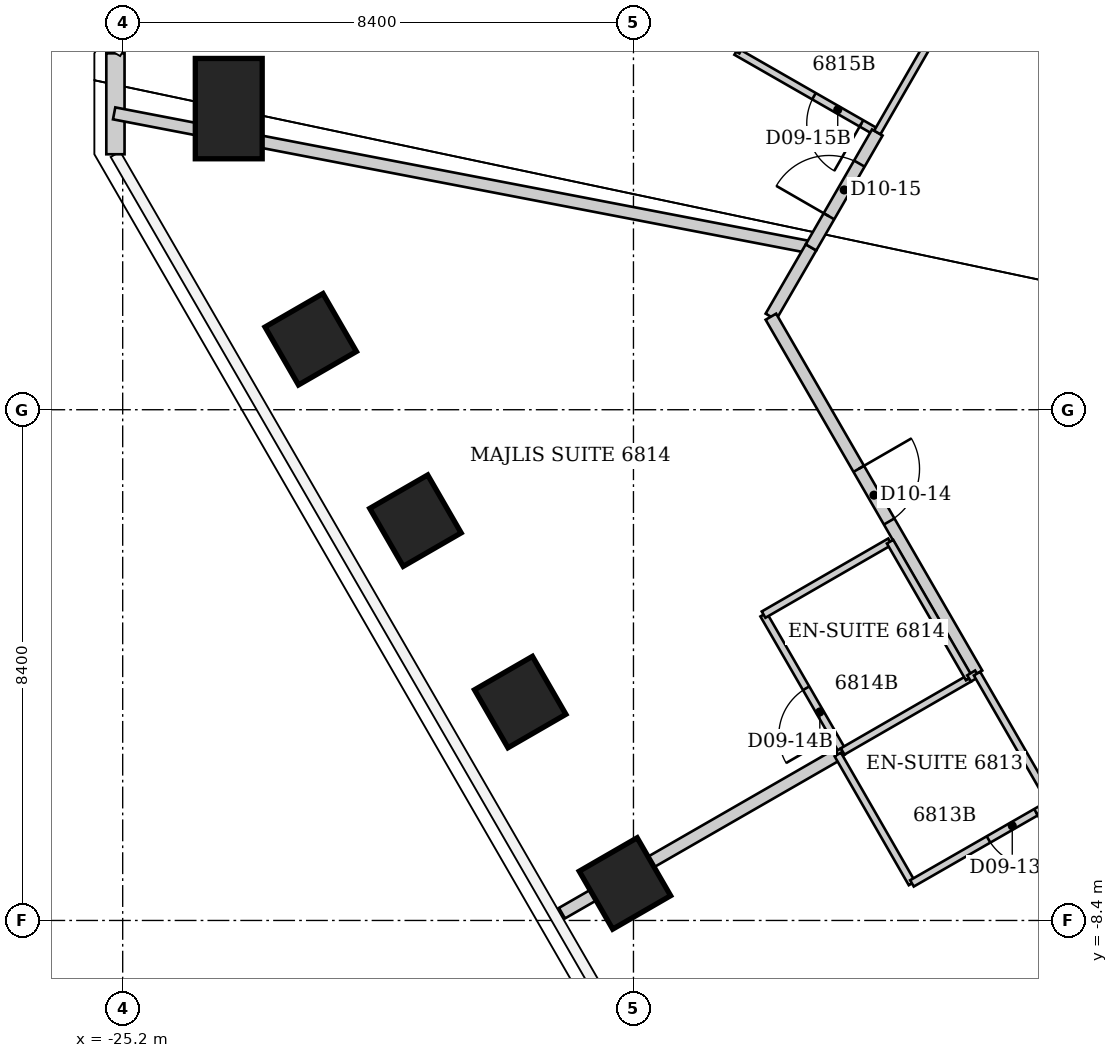
"""IFC4 building model, lengths in metres.
Left out: names, types, materials, properties, quantities, classifications, styles, units other than length and angle.
Written with IfcOpenShell. Run it as: python <this file> out.ifc"""

import sys

from ifc_helpers import new_model, si_unit, direction, frame, frame_2d, origin, origin_2d, place, context, subcontext, project, spatial, rectangle, extrude, element, fill, save


model = new_model("IFC4")
c1 = context("Model", 3, precision=1e-05, world=origin(), true_north=direction((0.0, 1.0)))
c2 = subcontext(c1, "Body", "Model", "MODEL_VIEW")
j1 = project(units=[si_unit("LENGTHUNIT", "METRE"), si_unit("PLANEANGLEUNIT", "RADIAN")], contexts=[c1])
p1 = place(None, origin())
s1 = spatial("IfcSite", under=j1, at=p1, CompositionType="ELEMENT")
p2 = place(p1, origin())
s2 = spatial("IfcBuilding", under=s1, at=p2, CompositionType="ELEMENT")
p3 = place(p2, frame((0.0, 0.0, 272.2)))
s3 = spatial("IfcBuildingStorey", under=s2, at=p3, CompositionType="ELEMENT", Elevation=272.2)
for number, where, z_axis, x_axis in (
    (1, (-16.94, -7.792, 0.0), (0.0, 0.0, 1.0), (-0.866, -0.5, 0.0)),
    (2, (-18.663, -4.808, 0.0), (0.0, 0.0, 1.0), (-0.866, -0.5, 0.0)),
    (3, (-20.385, -1.824, 0.0), (0.0, 0.0, 1.0), (-0.866, -0.5, 0.0)),
    (4, (-22.108, 1.159, 0.0), (0.0, 0.0, 1.0), (-0.866, -0.5, 0.0)),
):
    element("IfcColumn", number, at=place(p3, frame(where, z_axis=z_axis, x_axis=x_axis)), inside=s3, PredefinedType="COLUMN", context=c2, shape_type="SweptSolid", body=[
        extrude(rectangle(XDim=1.1, YDim=1.1, at=origin_2d()), origin(), (0.0, 0.0, 1.0), 3.8),
    ])
p4 = place(p3, frame((-23.456, 4.952, 0.0), z_axis=(0.0, 0.0, 1.0), x_axis=(-1.0, 0.0, 0.0)))
e5 = element("IfcColumn", 5, at=p4, inside=s3, PredefinedType="COLUMN", context=c2, shape_type="SweptSolid", body=[
    extrude(rectangle(XDim=1.1, YDim=1.65, at=origin_2d()), origin(), (0.0, 0.0, 1.0), 3.8),
])
p5 = place(p3, frame((-25.319, 4.202, 0.0), z_axis=(0.0, 0.0, 1.0), x_axis=(0.0, 1.0, 0.0)))
e6 = element("IfcWall", 6, at=p5, inside=s3, PredefinedType="SOLIDWALL", context=c2, shape_type="SweptSolid", body=[
    extrude(rectangle(XDim=1.66, YDim=0.3, at=frame_2d((0.83, 0.0))), origin(), (0.0, 0.0, 1.0), 3.64),
])
p6 = place(p3, frame((-25.341, 4.874, 0.0), z_axis=(0.0, 0.0, 1.0), x_axis=(0.98200120174, -0.188874666859, 0.0)))
e7 = element("IfcWall", 7, at=p6, inside=s3, PredefinedType="PARTITIONING", context=c2, shape_type="SweptSolid", body=[
    extrude(rectangle(XDim=11.621, YDim=0.2, at=frame_2d((5.81, 0.0))), origin(), (0.0, 0.0, 1.0), 3.64),
])
p7 = place(p3, frame((-17.976, -8.28, 0.0), z_axis=(0.0, 0.0, 1.0), x_axis=(0.866755072818, 0.498734041092, 0.0)))
e8 = element("IfcWall", 8, at=p7, inside=s3, PredefinedType="PARTITIONING", context=c2, shape_type="SweptSolid", body=[
    extrude(rectangle(XDim=5.233, YDim=0.2, at=frame_2d((2.617, 0.0))), origin(), (0.0, 0.0, 1.0), 3.038),
])
p8 = place(p3, frame((-15.11, 5.89, 0.0), z_axis=(0.0, 0.0, 1.0), x_axis=(0.867585049529, -0.497288831399, 0.0)))
e9 = element("IfcWall", 9, at=p8, inside=s3, PredefinedType="PARTITIONING", context=c2, shape_type="SweptSolid", body=[
    extrude(rectangle(XDim=2.674, YDim=0.12, at=frame_2d((1.337, 0.0))), origin(), (0.0, 0.0, 1.0), 3.64),
])
p9 = place(p8, frame((1.474, 0.0, 0.0)))
e10 = element("IfcOpeningElement", 10, at=p9, cuts=e9, PredefinedType="OPENING", context=c2, shape_type="SweptSolid", body=[
    extrude(rectangle(XDim=0.9, YDim=2.03, at=frame_2d((0.45, 1.015))), frame((0.0, 0.06, 0.0), z_axis=(0.0, -1.0, 0.0), x_axis=(1.0, 0.0, 0.0)), (0.0, 0.0, 1.0), 0.12),
])
p10 = place(p3, frame((-14.66, -3.37, 0.0), z_axis=(0.0, 0.0, 1.0), x_axis=(0.500291685314, -0.865856933682, 0.0)))
e11 = element("IfcWall", 11, at=p10, inside=s3, PredefinedType="PARTITIONING", context=c2, shape_type="SweptSolid", body=[
    extrude(rectangle(XDim=2.599, YDim=0.12, at=frame_2d((1.299, 0.0))), origin(), (0.0, 0.0, 1.0), 3.64),
])
p11 = place(p10, frame((1.399, 0.0, 0.0)))
e12 = element("IfcOpeningElement", 12, at=p11, cuts=e11, PredefinedType="OPENING", context=c2, shape_type="SweptSolid", body=[
    extrude(rectangle(XDim=0.9, YDim=2.03, at=frame_2d((0.45, 1.015))), frame((0.0, 0.06, 0.0), z_axis=(0.0, -1.0, 0.0), x_axis=(1.0, 0.0, 0.0)), (0.0, 0.0, 1.0), 0.12),
])
p12 = place(p3, frame((-14.54, 1.53, 0.0), z_axis=(0.0, 0.0, 1.0), x_axis=(0.501160466528, 0.865354370642, 0.0)))
e13 = element("IfcWall", 13, at=p12, inside=s3, PredefinedType="PARTITIONING", context=c2, shape_type="SweptSolid", body=[
    extrude(rectangle(XDim=1.317, YDim=0.2, at=frame_2d((0.659, 0.0))), origin(), (0.0, 0.0, 1.0), 3.64),
])
p13 = place(p3, frame((-14.54, 1.53, 0.0), z_axis=(0.0, 0.0, 1.0), x_axis=(0.500113178326, -0.865960050386, 0.0)))
e14 = element("IfcWall", 14, at=p13, inside=s3, PredefinedType="PARTITIONING", context=c2, shape_type="SweptSolid", body=[
    extrude(rectangle(XDim=6.779, YDim=0.2, at=frame_2d((3.389, 0.0))), origin(), (0.0, 0.0, 1.0), 3.64),
])
p14 = place(p13, frame((2.889, 0.0, 0.0)))
e15 = element("IfcOpeningElement", 15, at=p14, cuts=e14, PredefinedType="OPENING", context=c2, shape_type="SweptSolid", body=[
    extrude(rectangle(XDim=1.0, YDim=2.13, at=frame_2d((0.5, 1.065))), frame((0.0, 0.1, 0.0), z_axis=(0.0, -1.0, 0.0), x_axis=(1.0, 0.0, 0.0)), (0.0, 0.0, 1.0), 0.2),
])
p15 = place(p3, frame((-13.88, 2.67, 0.0), z_axis=(0.0, 0.0, 1.0), x_axis=(0.499509324401, 0.866308510195, 0.0)))
e16 = element("IfcWall", 16, at=p15, inside=s3, PredefinedType="PARTITIONING", context=c2, shape_type="SweptSolid", body=[
    extrude(rectangle(XDim=2.182, YDim=0.2, at=frame_2d((1.091, 0.0))), origin(), (0.0, 0.0, 1.0), 3.64),
])
p16 = place(p15, frame((0.591, 0.0, 0.0)))
e17 = element("IfcOpeningElement", 17, at=p16, cuts=e16, PredefinedType="OPENING", context=c2, shape_type="SweptSolid", body=[
    extrude(rectangle(XDim=1.0, YDim=2.13, at=frame_2d((0.5, 1.065))), frame((0.0, 0.1, 0.0), z_axis=(0.0, -1.0, 0.0), x_axis=(1.0, 0.0, 0.0)), (0.0, 0.0, 1.0), 0.2),
])
p17 = place(p3, frame((-13.88, 8.01, 0.0), z_axis=(0.0, 0.0, 1.0), x_axis=(-0.501888006485, -0.864932615264, 0.0)))
e18 = element("IfcWall", 18, at=p17, inside=s3, PredefinedType="PARTITIONING", context=c2, shape_type="SweptSolid", body=[
    extrude(rectangle(XDim=2.451, YDim=0.12, at=frame_2d((1.226, 0.0))), origin(), (0.0, 0.0, 1.0), 3.64),
])
p18 = place(p3, frame((-13.44, -5.67, 0.0), z_axis=(0.0, 0.0, 1.0), x_axis=(0.865840118177, 0.500320786851, 0.0)))
e19 = element("IfcWall", 19, at=p18, inside=s3, PredefinedType="PARTITIONING", context=c2, shape_type="SweptSolid", body=[
    extrude(rectangle(XDim=0.094, YDim=0.12, at=frame_2d((0.047, 0.0))), origin(), (0.0, 0.0, 1.0), 3.64),
])
p19 = place(p3, frame((-13.44, -5.67, 0.0), z_axis=(0.0, 0.0, 1.0), x_axis=(0.498748634132, -0.866746675766, 0.0)))
e20 = element("IfcWall", 20, at=p19, inside=s3, PredefinedType="PARTITIONING", context=c2, shape_type="SweptSolid", body=[
    extrude(rectangle(XDim=2.446, YDim=0.12, at=frame_2d((1.223, 0.0))), origin(), (0.0, 0.0, 1.0), 3.64),
])
p20 = place(p3, frame((-13.36, -5.62, 0.0), z_axis=(0.0, 0.0, 1.0), x_axis=(0.866177122335, 0.499737123639, 0.0)))
e21 = element("IfcWall", 21, at=p20, inside=s3, PredefinedType="PARTITIONING", context=c2, shape_type="SweptSolid", body=[
    extrude(rectangle(XDim=2.401, YDim=0.12, at=frame_2d((1.201, 0.0))), origin(), (0.0, 0.0, 1.0), 3.64),
])
p21 = place(p3, frame((-12.79, 4.56, 0.0), z_axis=(0.0, 0.0, 1.0), x_axis=(0.499252904436, 0.866456310158, 0.0)))
e22 = element("IfcWall", 22, at=p21, inside=s3, PredefinedType="PARTITIONING", context=c2, shape_type="SweptSolid", body=[
    extrude(rectangle(XDim=2.446, YDim=0.12, at=frame_2d((1.223, 0.0))), origin(), (0.0, 0.0, 1.0), 3.64),
])
p22 = place(p3, frame((-12.58, -2.17, 0.0), z_axis=(0.0, 0.0, 1.0), x_axis=(-0.866177122335, -0.499737123639, 0.0)))
e23 = element("IfcWall", 23, at=p22, inside=s3, PredefinedType="PARTITIONING", context=c2, shape_type="SweptSolid", body=[
    extrude(rectangle(XDim=2.401, YDim=0.12, at=frame_2d((1.201, 0.0))), origin(), (0.0, 0.0, 1.0), 3.64),
])
p23 = place(p3, frame((-12.22, -7.79, 0.0), z_axis=(0.0, 0.0, 1.0), x_axis=(0.867306827682, 0.497773911185, 0.0)))
e24 = element("IfcWall", 24, at=p23, inside=s3, PredefinedType="PARTITIONING", context=c2, shape_type="SweptSolid", body=[
    extrude(rectangle(XDim=2.652, YDim=0.12, at=frame_2d((1.326, 0.0))), origin(), (0.0, 0.0, 1.0), 3.64),
])
p24 = place(p23, frame((1.452, 0.0, 0.0)))
e25 = element("IfcOpeningElement", 25, at=p24, cuts=e24, PredefinedType="OPENING", context=c2, shape_type="SweptSolid", body=[
    extrude(rectangle(XDim=0.9, YDim=2.03, at=frame_2d((0.45, 1.015))), frame((0.0, 0.06, 0.0), z_axis=(0.0, -1.0, 0.0), x_axis=(1.0, 0.0, 0.0)), (0.0, 0.0, 1.0), 0.12),
])
p25 = place(p3, frame((-11.28, -4.42, 0.0), z_axis=(0.0, 0.0, 1.0), x_axis=(-0.500291685314, 0.865856933682, 0.0)))
e26 = element("IfcWall", 26, at=p25, inside=s3, PredefinedType="PARTITIONING", context=c2, shape_type="SweptSolid", body=[
    extrude(rectangle(XDim=2.599, YDim=0.12, at=frame_2d((1.299, 0.0))), origin(), (0.0, 0.0, 1.0), 3.64),
])
p26 = place(p3, frame((-11.28, -4.42, 0.0), z_axis=(0.0, 0.0, 1.0), x_axis=(0.851933114221, 0.5236506172, 0.0)))
e27 = element("IfcWall", 27, at=p26, inside=s3, PredefinedType="PARTITIONING", context=c2, shape_type="SweptSolid", body=[
    extrude(rectangle(XDim=0.152, YDim=0.12, at=frame_2d((0.076, 0.0))), origin(), (0.0, 0.0, 1.0), 3.64),
])
p27 = place(p3, frame((-11.15, -4.34, 0.0), z_axis=(0.0, 0.0, 1.0), x_axis=(0.500089055364, -0.86597398154, 0.0)))
e28 = element("IfcWall", 28, at=p27, inside=s3, PredefinedType="PARTITIONING", context=c2, shape_type="SweptSolid", body=[
    extrude(rectangle(XDim=2.459, YDim=0.12, at=frame_2d((1.23, 0.0))), origin(), (0.0, 0.0, 1.0), 3.64),
])
p28 = place(p24, origin())
e29 = element("IfcDoor", 29, at=p28, inside=s3, OperationType="SINGLE_SWING_RIGHT", PredefinedType="DOOR", context=c2, shape_type="SweptSolid", body=[
    extrude(rectangle(XDim=0.9, YDim=2.03, at=frame_2d((0.45, 1.015))), frame((0.0, 0.025, 0.0), z_axis=(0.0, -1.0, 0.0), x_axis=(1.0, 0.0, 0.0)), (0.0, 0.0, 1.0), 0.05),
])
fill(e25, e29)
p29 = place(p14, origin())
e30 = element("IfcDoor", 30, at=p29, inside=s3, OperationType="SINGLE_SWING_LEFT", PredefinedType="DOOR", context=c2, shape_type="SweptSolid", body=[
    extrude(rectangle(XDim=1.0, YDim=2.13, at=frame_2d((0.5, 1.065))), frame((0.0, 0.025, 0.0), z_axis=(0.0, -1.0, 0.0), x_axis=(1.0, 0.0, 0.0)), (0.0, 0.0, 1.0), 0.05),
])
fill(e15, e30)
p30 = place(p11, origin())
e31 = element("IfcDoor", 31, at=p30, inside=s3, OperationType="SINGLE_SWING_RIGHT", PredefinedType="DOOR", context=c2, shape_type="SweptSolid", body=[
    extrude(rectangle(XDim=0.9, YDim=2.03, at=frame_2d((0.45, 1.015))), frame((0.0, 0.025, 0.0), z_axis=(0.0, -1.0, 0.0), x_axis=(1.0, 0.0, 0.0)), (0.0, 0.0, 1.0), 0.05),
])
fill(e12, e31)
p31 = place(p16, origin())
e32 = element("IfcDoor", 32, at=p31, inside=s3, OperationType="SINGLE_SWING_LEFT", PredefinedType="DOOR", context=c2, shape_type="SweptSolid", body=[
    extrude(rectangle(XDim=1.0, YDim=2.13, at=frame_2d((0.5, 1.065))), frame((0.0, 0.025, 0.0), z_axis=(0.0, -1.0, 0.0), x_axis=(1.0, 0.0, 0.0)), (0.0, 0.0, 1.0), 0.05),
])
fill(e17, e32)
p32 = place(p9, origin())
e33 = element("IfcDoor", 33, at=p32, inside=s3, OperationType="SINGLE_SWING_RIGHT", PredefinedType="DOOR", context=c2, shape_type="SweptSolid", body=[
    extrude(rectangle(XDim=0.9, YDim=2.03, at=frame_2d((0.45, 1.015))), frame((0.0, 0.025, 0.0), z_axis=(0.0, -1.0, 0.0), x_axis=(1.0, 0.0, 0.0)), (0.0, 0.0, 1.0), 0.05),
])
fill(e10, e33)
save(model, sys.argv[1])
